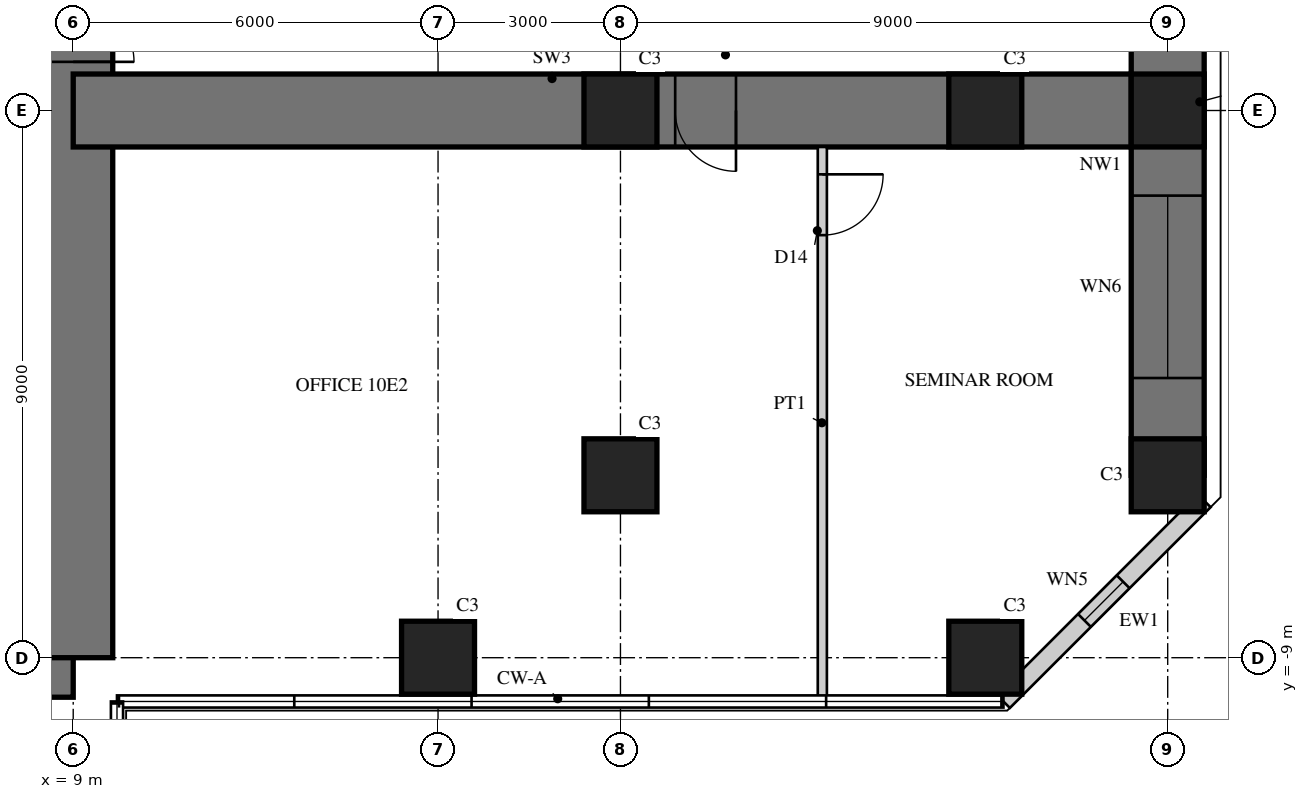
"""IFC4 building model, lengths in metres.
Left out: names, types, materials, properties, quantities, classifications, styles, units other than length and angle.
Written with IfcOpenShell. Run it as: python <this file> out.ifc"""

import sys

from ifc_helpers import new_model, si_unit, direction, frame, frame_2d, origin, origin_2d, place, context, subcontext, project, spatial, rectangle, hollow_rectangle, extrude, element, fill, save


model = new_model("IFC4")
c1 = context("Model", 3, precision=1e-05, world=origin(), true_north=direction((0.0, 1.0)))
c2 = subcontext(c1, "Body", "Model", "MODEL_VIEW")
j1 = project(units=[si_unit("LENGTHUNIT", "METRE"), si_unit("PLANEANGLEUNIT", "RADIAN")], contexts=[c1])
p1 = place(None, origin())
s1 = spatial("IfcSite", under=j1, at=p1, CompositionType="ELEMENT")
p2 = place(p1, origin())
s2 = spatial("IfcBuilding", under=s1, at=p2, CompositionType="ELEMENT")
p3 = place(p2, frame((0.0, 0.0, 43.5)))
s3 = spatial("IfcBuildingStorey", under=s2, at=p3, CompositionType="ELEMENT", Elevation=43.5)
p4 = place(p3, frame((-9.0, -9.0, 0.0), z_axis=(0.0, 0.0, 1.0), x_axis=(1.0, 0.0, 0.0)))
e1 = element("IfcWall", 1, at=p4, inside=s3, PredefinedType="SHEAR", context=c2, shape_type="SweptSolid", body=[
    extrude(rectangle(XDim=18.0, YDim=1.3, at=frame_2d((9.0, 0.0))), origin(), (0.0, 0.0, 1.0), 4.0),
])
p5 = place(p4, frame((9.8, 0.0, 0.0)))
e2 = element("IfcOpeningElement", 2, at=p5, cuts=e1, PredefinedType="OPENING", context=c2, shape_type="SweptSolid", body=[
    extrude(rectangle(XDim=1.0, YDim=2.4, at=frame_2d((0.5, 1.2))), frame((0.0, 0.66, 0.0), z_axis=(0.0, -1.0, 0.0), x_axis=(1.0, 0.0, 0.0)), (0.0, 0.0, 1.0), 1.32),
])
p6 = place(p3, frame((9.0, -9.0, 0.0), z_axis=(0.0, 0.0, 1.0), x_axis=(0.0, 1.0, 0.0)))
e3 = element("IfcWall", 3, at=p6, inside=s3, PredefinedType="SHEAR", context=c2, shape_type="SweptSolid", body=[
    extrude(rectangle(XDim=18.0, YDim=1.3, at=frame_2d((9.0, 0.0))), origin(), (0.0, 0.0, 1.0), 4.0),
])
p7 = place(p6, frame((9.8, 0.0, 0.0)))
e4 = element("IfcOpeningElement", 4, at=p7, cuts=e3, PredefinedType="OPENING", context=c2, shape_type="SweptSolid", body=[
    extrude(rectangle(XDim=1.0, YDim=2.4, at=frame_2d((0.5, 1.2))), frame((0.0, 0.66, 0.0), z_axis=(0.0, -1.0, 0.0), x_axis=(1.0, 0.0, 0.0)), (0.0, 0.0, 1.0), 1.32),
])
p8 = place(p3, frame((9.0, 0.0, 0.0), z_axis=(0.0, 0.0, 1.0), x_axis=(1.0, 0.0, 0.0)))
e5 = element("IfcWall", 5, at=p8, inside=s3, PredefinedType="SHEAR", context=c2, shape_type="SweptSolid", body=[
    extrude(rectangle(XDim=18.0, YDim=1.2, at=frame_2d((9.0, 0.0))), origin(), (0.0, 0.0, 1.0), 4.0),
])
p9 = place(p8, frame((9.9, 0.0, 0.0)))
e6 = element("IfcOpeningElement", 6, at=p9, cuts=e5, PredefinedType="OPENING", context=c2, shape_type="SweptSolid", body=[
    extrude(rectangle(XDim=1.0, YDim=2.2, at=frame_2d((0.5, 1.1))), frame((0.0, 0.61, 0.0), z_axis=(0.0, -1.0, 0.0), x_axis=(1.0, 0.0, 0.0)), (0.0, 0.0, 1.0), 1.22),
])
p10 = place(p3, frame((27.0, -6.0, 0.0), z_axis=(0.0, 0.0, 1.0), x_axis=(0.0, 1.0, 0.0)))
e7 = element("IfcWall", 7, at=p10, inside=s3, PredefinedType="SHEAR", context=c2, shape_type="SweptSolid", body=[
    extrude(rectangle(XDim=12.0, YDim=1.2, at=frame_2d((6.0, 0.0))), origin(), (0.0, 0.0, 1.0), 4.0),
])
p11 = place(p10, frame((1.6, 0.0, 0.6)))
e8 = element("IfcOpeningElement", 8, at=p11, cuts=e7, PredefinedType="OPENING", context=c2, shape_type="SweptSolid", body=[
    extrude(rectangle(XDim=3.0, YDim=2.4, at=frame_2d((1.5, 1.2))), frame((0.0, 0.61, 0.0), z_axis=(0.0, -1.0, 0.0), x_axis=(1.0, 0.0, 0.0)), (0.0, 0.0, 1.0), 1.22),
])
p12 = place(p10, frame((7.4, 0.0, 0.6)))
e9 = element("IfcOpeningElement", 9, at=p12, cuts=e7, PredefinedType="OPENING", context=c2, shape_type="SweptSolid", body=[
    extrude(rectangle(XDim=3.0, YDim=2.4, at=frame_2d((1.5, 1.2))), frame((0.0, 0.61, 0.0), z_axis=(0.0, -1.0, 0.0), x_axis=(1.0, 0.0, 0.0)), (0.0, 0.0, 1.0), 1.22),
])
for number, where, z_axis, x_axis in (
    (10, (15.0, -9.0, 0.0), (0.0, 0.0, 1.0), (1.0, 0.0, 0.0)),
    (11, (24.0, -9.0, 0.0), (0.0, 0.0, 1.0), (1.0, 0.0, 0.0)),
    (12, (27.0, -6.0, 0.0), (0.0, 0.0, 1.0), (1.0, 0.0, 0.0)),
    (13, (27.0, 0.0, 0.0), (0.0, 0.0, 1.0), (1.0, 0.0, 0.0)),
    (14, (18.0, -6.0, 0.0), (0.0, 0.0, 1.0), (1.0, 0.0, 0.0)),
    (15, (18.0, 0.0, 0.0), (0.0, 0.0, 1.0), (1.0, 0.0, 0.0)),
    (16, (24.0, 0.0, 0.0), (0.0, 0.0, 1.0), (1.0, 0.0, 0.0)),
):
    element("IfcColumn", number, at=place(p3, frame(where, z_axis=z_axis, x_axis=x_axis)), inside=s3, PredefinedType="COLUMN", context=c2, shape_type="SweptSolid", body=[
        extrude(rectangle(XDim=1.2, YDim=1.2, at=origin_2d()), origin(), (0.0, 0.0, 1.0), 4.0),
    ])
p13 = place(p3, frame((24.298, -9.72, 0.0), z_axis=(0.0, 0.0, 1.0), x_axis=(0.707106781187, 0.707106781187, 0.0)))
e17 = element("IfcWall", 17, at=p13, inside=s3, PredefinedType="SOLIDWALL", context=c2, shape_type="SweptSolid", body=[
    extrude(rectangle(XDim=4.669, YDim=0.3, at=frame_2d((2.335, 0.0))), origin(), (0.0, 0.0, 1.0), 3.8),
])
p14 = place(p13, frame((1.885, 0.0, 0.3)))
e18 = element("IfcOpeningElement", 18, at=p14, cuts=e17, PredefinedType="OPENING", context=c2, shape_type="SweptSolid", body=[
    extrude(rectangle(XDim=0.9, YDim=2.4, at=frame_2d((0.45, 1.2))), frame((0.0, 0.16, 0.0), z_axis=(0.0, -1.0, 0.0), x_axis=(1.0, 0.0, 0.0)), (0.0, 0.0, 1.0), 0.32),
])
p15 = place(p3, frame((21.32, -9.68, 0.0), z_axis=(0.0, 0.0, 1.0), x_axis=(0.0, 1.0, 0.0)))
e19 = element("IfcWall", 19, at=p15, inside=s3, PredefinedType="PARTITIONING", context=c2, shape_type="SweptSolid", body=[
    extrude(rectangle(XDim=9.08, YDim=0.15, at=frame_2d((4.54, 0.0))), origin(), (0.0, 0.0, 1.0), 3.8),
])
p16 = place(p15, frame((7.63, 0.0, 0.0)))
e20 = element("IfcOpeningElement", 20, at=p16, cuts=e19, PredefinedType="OPENING", context=c2, shape_type="SweptSolid", body=[
    extrude(rectangle(XDim=1.0, YDim=2.2, at=frame_2d((0.5, 1.1))), frame((0.0, 0.085, 0.0), z_axis=(0.0, -1.0, 0.0), x_axis=(1.0, 0.0, 0.0)), (0.0, 0.0, 1.0), 0.17),
])
p17 = place(p14, origin())
e21 = element("IfcWindow", 21, at=p17, inside=s3, PartitioningType="SINGLE_PANEL", PredefinedType="WINDOW", context=c2, shape_type="SweptSolid", body=[
    extrude(hollow_rectangle(XDim=0.9, YDim=2.4, WallThickness=0.06, at=frame_2d((0.45, 1.2))), frame((0.0, 0.03, 0.0), z_axis=(0.0, -1.0, 0.0), x_axis=(1.0, 0.0, 0.0)), (0.0, 0.0, 1.0), 0.06),
    extrude(rectangle(XDim=0.779, YDim=2.279, at=frame_2d((0.45, 1.2))), frame((0.0, 0.03, 0.0), z_axis=(0.0, -1.0, 0.0), x_axis=(1.0, 0.0, 0.0)), (0.0, 0.0, 1.0), 0.06),
])
fill(e18, e21)
p18 = place(p11, origin())
e22 = element("IfcWindow", 22, at=p18, inside=s3, PartitioningType="SINGLE_PANEL", PredefinedType="WINDOW", context=c2, shape_type="SweptSolid", body=[
    extrude(hollow_rectangle(XDim=3.0, YDim=2.4, WallThickness=0.06, at=frame_2d((1.5, 1.2))), frame((0.0, 0.03, 0.0), z_axis=(0.0, -1.0, 0.0), x_axis=(1.0, 0.0, 0.0)), (0.0, 0.0, 1.0), 0.06),
    extrude(rectangle(XDim=2.879, YDim=2.279, at=frame_2d((1.5, 1.2))), frame((0.0, 0.03, 0.0), z_axis=(0.0, -1.0, 0.0), x_axis=(1.0, 0.0, 0.0)), (0.0, 0.0, 1.0), 0.06),
])
fill(e8, e22)
p19 = place(p16, frame((1.0, 0.0, 0.0), z_axis=(0.0, 0.0, 1.0), x_axis=(-1.0, 0.0, 0.0)))
e23 = element("IfcDoor", 23, at=p19, inside=s3, OperationType="SINGLE_SWING_LEFT", PredefinedType="DOOR", context=c2, shape_type="SweptSolid", body=[
    extrude(rectangle(XDim=1.0, YDim=2.2, at=frame_2d((0.5, 1.1))), frame((0.0, 0.025, 0.0), z_axis=(0.0, -1.0, 0.0), x_axis=(1.0, 0.0, 0.0)), (0.0, 0.0, 1.0), 0.05),
])
fill(e20, e23)
p20 = place(p9, frame((1.0, 0.0, 0.0), z_axis=(0.0, 0.0, 1.0), x_axis=(-1.0, 0.0, 0.0)))
e24 = element("IfcDoor", 24, at=p20, inside=s3, OperationType="SINGLE_SWING_LEFT", PredefinedType="DOOR", context=c2, shape_type="SweptSolid", body=[
    extrude(rectangle(XDim=1.0, YDim=2.2, at=frame_2d((0.5, 1.1))), frame((0.0, 0.025, 0.0), z_axis=(0.0, -1.0, 0.0), x_axis=(1.0, 0.0, 0.0)), (0.0, 0.0, 1.0), 0.05),
])
fill(e6, e24)
p21 = place(p7, frame((1.0, 0.0, 0.0), z_axis=(0.0, 0.0, 1.0), x_axis=(-1.0, 0.0, 0.0)))
e25 = element("IfcDoor", 25, at=p21, inside=s3, OperationType="SINGLE_SWING_RIGHT", PredefinedType="DOOR", context=c2, shape_type="SweptSolid", body=[
    extrude(rectangle(XDim=1.0, YDim=2.4, at=frame_2d((0.5, 1.2))), frame((0.0, -0.005, 0.0), z_axis=(0.0, -1.0, 0.0), x_axis=(1.0, 0.0, 0.0)), (0.0, 0.0, 1.0), 0.05),
])
fill(e4, e25)
save(model, sys.argv[1])
